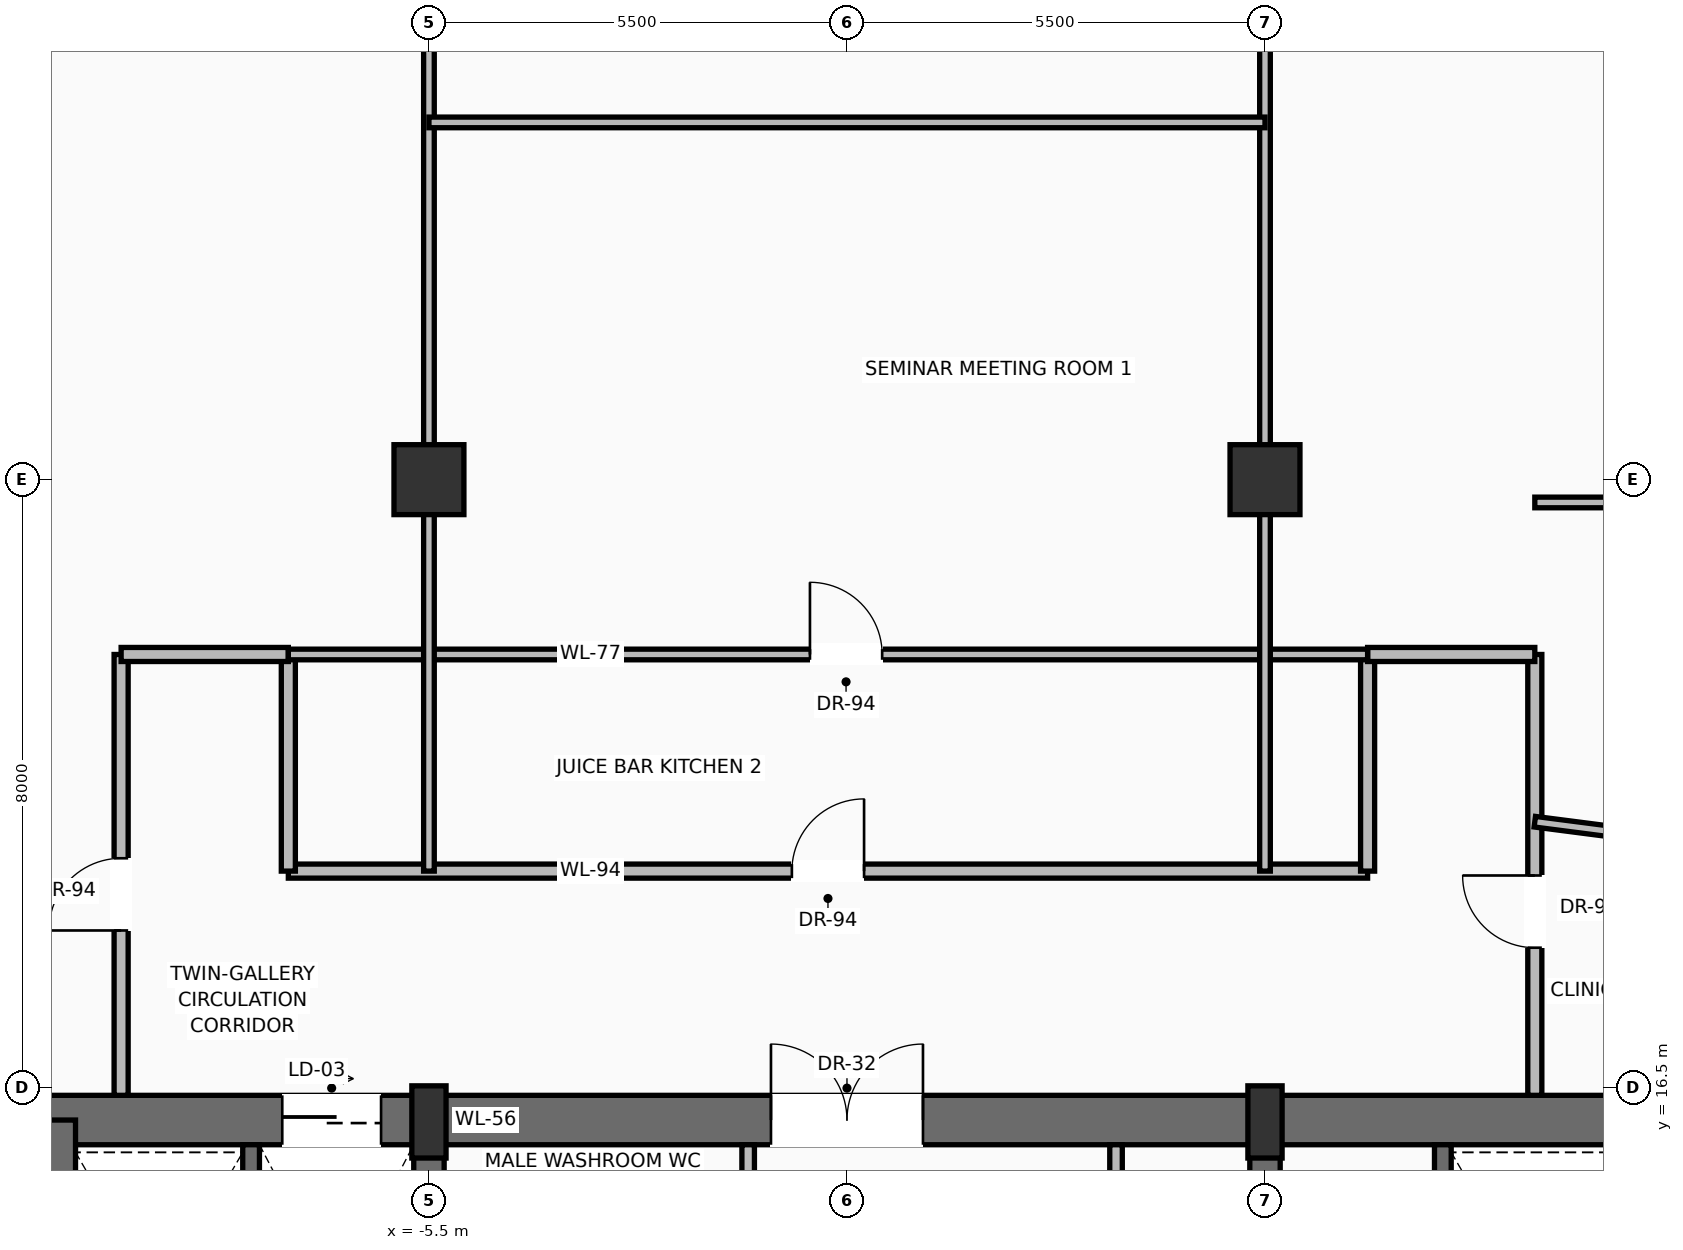
"""IFC4 building model, lengths in metres.
Left out: names, types, materials, properties, quantities, classifications, styles, units other than length and angle.
Written with IfcOpenShell. Run it as: python <this file> out.ifc"""

import sys

from ifc_helpers import new_model, si_unit, direction, frame, frame_2d, origin, origin_2d, place, context, subcontext, project, spatial, rectangle, extrude, source, transform, mapped, element, fill, save


model = new_model("IFC4")
c1 = context("Model", 3, precision=1e-05, world=origin(), true_north=direction((0.0, 1.0)))
c2 = subcontext(c1, "Body", "Model", "MODEL_VIEW")
j1 = project(units=[si_unit("LENGTHUNIT", "METRE"), si_unit("PLANEANGLEUNIT", "RADIAN")], contexts=[c1])
p1 = place(None, origin())
s1 = spatial("IfcSite", under=j1, at=p1, CompositionType="ELEMENT")
p2 = place(p1, origin())
s2 = spatial("IfcBuilding", under=s1, at=p2, CompositionType="ELEMENT")
p3 = place(p2, frame((0.0, 0.0, 204.3)))
s3 = spatial("IfcBuildingStorey", under=s2, at=p3, CompositionType="ELEMENT", Elevation=204.3)
p4 = place(p3, frame((-10.8, 16.075, 0.0), z_axis=(0.0, 0.0, 1.0), x_axis=(1.0, 0.0, 0.0)))
e1 = element("IfcWall", 1, at=p4, inside=s3, PredefinedType="SHEAR", context=c2, shape_type="SweptSolid", body=[
    extrude(rectangle(XDim=21.6, YDim=0.65, at=frame_2d((10.8, 0.0))), origin(), (0.0, 0.0, 1.0), 3.47),
])
p5 = place(p4, frame((3.37, 0.0, 0.0)))
e2 = element("IfcOpeningElement", 2, at=p5, cuts=e1, PredefinedType="OPENING", context=c2, shape_type="SweptSolid", body=[
    extrude(rectangle(XDim=1.3, YDim=2.3, at=frame_2d((0.65, 1.15))), frame((0.0, 0.335, 0.0), z_axis=(0.0, -1.0, 0.0), x_axis=(1.0, 0.0, 0.0)), (0.0, 0.0, 1.0), 0.67),
])
p6 = place(p4, frame((9.8, 0.0, 0.0)))
e3 = element("IfcOpeningElement", 3, at=p6, cuts=e1, PredefinedType="OPENING", context=c2, shape_type="SweptSolid", body=[
    extrude(rectangle(XDim=2.0, YDim=2.4, at=frame_2d((1.0, 1.2))), frame((0.0, 0.335, 0.0), z_axis=(0.0, -1.0, 0.0), x_axis=(1.0, 0.0, 0.0)), (0.0, 0.0, 1.0), 0.67),
])
p7 = place(p3, frame((-10.475, 0.525, 0.0), z_axis=(0.0, 0.0, 1.0), x_axis=(0.0, 1.0, 0.0)))
e4 = element("IfcWall", 4, at=p7, inside=s3, PredefinedType="SHEAR", context=c2, shape_type="SweptSolid", body=[
    extrude(rectangle(XDim=15.55, YDim=0.65, at=frame_2d((7.775, 0.0))), origin(), (0.0, 0.0, 1.0), 3.47),
])
p8 = place(p3, frame((-5.5, 0.525, 0.0), z_axis=(0.0, 0.0, 1.0), x_axis=(0.0, 1.0, 0.0)))
e5 = element("IfcWall", 5, at=p8, inside=s3, PredefinedType="SHEAR", context=c2, shape_type="SweptSolid", body=[
    extrude(rectangle(XDim=15.55, YDim=0.4, at=frame_2d((7.775, 0.0))), origin(), (0.0, 0.0, 1.0), 3.47),
])
p9 = place(p8, frame((8.975, 0.0, 0.0)))
e6 = element("IfcOpeningElement", 6, at=p9, cuts=e5, PredefinedType="OPENING", context=c2, shape_type="SweptSolid", body=[
    extrude(rectangle(XDim=1.1, YDim=2.2, at=frame_2d((0.55, 1.1))), frame((0.0, 0.21, 0.0), z_axis=(0.0, -1.0, 0.0), x_axis=(1.0, 0.0, 0.0)), (0.0, 0.0, 1.0), 0.42),
])
p10 = place(p3, frame((5.5, 0.525, 0.0), z_axis=(0.0, 0.0, 1.0), x_axis=(0.0, 1.0, 0.0)))
e7 = element("IfcWall", 7, at=p10, inside=s3, PredefinedType="SHEAR", context=c2, shape_type="SweptSolid", body=[
    extrude(rectangle(XDim=15.55, YDim=0.4, at=frame_2d((7.775, 0.0))), origin(), (0.0, 0.0, 1.0), 3.47),
])
p11 = place(p10, frame((8.975, 0.0, 0.0)))
e8 = element("IfcOpeningElement", 8, at=p11, cuts=e7, PredefinedType="OPENING", context=c2, shape_type="SweptSolid", body=[
    extrude(rectangle(XDim=1.1, YDim=2.2, at=frame_2d((0.55, 1.1))), frame((0.0, 0.21, 0.0), z_axis=(0.0, -1.0, 0.0), x_axis=(1.0, 0.0, 0.0)), (0.0, 0.0, 1.0), 0.42),
])
m1 = source(origin(), c2, "Body", "SweptSolid", [
    extrude(rectangle(XDim=0.45, YDim=0.95, at=origin_2d()), origin(), (0.0, 0.0, 1.0), 3.7),
])
for number, where, z_axis, x_axis in (
    (9, (-5.5, 16.05, 0.0), (0.0, 0.0, 1.0), (1.0, 0.0, 0.0)),
    (10, (5.5, 16.05, 0.0), (0.0, 0.0, 1.0), (1.0, 0.0, 0.0)),
):
    element("IfcColumn", number, at=place(p3, frame(where, z_axis=z_axis, x_axis=x_axis)), inside=s3, PredefinedType="PILASTER", context=c2, shape_type="MappedRepresentation", body=[
        mapped(m1, transform((0.0, 0.0, 0.0), scale=1.0)),
    ])
m2 = source(origin(), c2, "Body", "SweptSolid", [
    extrude(rectangle(XDim=0.92, YDim=0.92, at=origin_2d()), origin(), (0.0, 0.0, 1.0), 3.7),
])
for number, where, z_axis, x_axis in (
    (11, (-5.5, 24.5, 0.0), (0.0, 0.0, 1.0), (1.0, 0.0, 0.0)),
    (12, (5.5, 24.5, 0.0), (0.0, 0.0, 1.0), (1.0, 0.0, 0.0)),
):
    element("IfcColumn", number, at=place(p3, frame(where, z_axis=z_axis, x_axis=x_axis)), inside=s3, PredefinedType="COLUMN", context=c2, shape_type="MappedRepresentation", body=[
        mapped(m2, transform((0.0, 0.0, 0.0), scale=1.0)),
    ])
p12 = place(p3, frame((-20.107, 15.909, 0.0), z_axis=(0.0, 0.0, 1.0), x_axis=(0.520259714572, 0.854008096796, 0.0)))
e13 = element("IfcWall", 13, at=p12, inside=s3, PredefinedType="SOLIDWALL", context=c2, shape_type="SweptSolid", body=[
    extrude(rectangle(XDim=19.115, YDim=0.28, at=frame_2d((9.558, 0.0))), origin(), (0.0, 0.0, 1.0), 3.05),
])
p13 = place(p12, frame((4.588, 0.0, 0.0)))
e14 = element("IfcOpeningElement", 14, at=p13, cuts=e13, PredefinedType="OPENING", context=c2, shape_type="SweptSolid", body=[
    extrude(rectangle(XDim=1.6, YDim=2.35, at=frame_2d((0.8, 1.175))), frame((0.0, 0.15, 0.0), z_axis=(0.0, -1.0, 0.0), x_axis=(1.0, 0.0, 0.0)), (0.0, 0.0, 1.0), 0.3),
])
p14 = place(p12, frame((12.998, 0.0, 0.9)))
e15 = element("IfcOpeningElement", 15, at=p14, cuts=e13, PredefinedType="OPENING", context=c2, shape_type="SweptSolid", body=[
    extrude(rectangle(XDim=2.0, YDim=1.85, at=frame_2d((1.0, 0.925))), frame((0.0, 0.15, 0.0), z_axis=(0.0, -1.0, 0.0), x_axis=(1.0, 0.0, 0.0)), (0.0, 0.0, 1.0), 0.3),
])
p15 = place(p3, frame((9.417, 32.314, 0.0), z_axis=(0.0, 0.0, 1.0), x_axis=(0.533466142651, -0.845821420067, 0.0)))
e16 = element("IfcWall", 16, at=p15, inside=s3, PredefinedType="SOLIDWALL", context=c2, shape_type="SweptSolid", body=[
    extrude(rectangle(XDim=19.147, YDim=0.28, at=frame_2d((9.574, 0.0))), origin(), (0.0, 0.0, 1.0), 3.05),
])
p16 = place(p15, frame((4.595, 0.0, 0.0)))
e17 = element("IfcOpeningElement", 17, at=p16, cuts=e16, PredefinedType="OPENING", context=c2, shape_type="SweptSolid", body=[
    extrude(rectangle(XDim=1.6, YDim=2.35, at=frame_2d((0.8, 1.175))), frame((0.0, 0.15, 0.0), z_axis=(0.0, -1.0, 0.0), x_axis=(1.0, 0.0, 0.0)), (0.0, 0.0, 1.0), 0.3),
])
p17 = place(p15, frame((13.02, 0.0, 0.9)))
e18 = element("IfcOpeningElement", 18, at=p17, cuts=e16, PredefinedType="OPENING", context=c2, shape_type="SweptSolid", body=[
    extrude(rectangle(XDim=2.0, YDim=1.85, at=frame_2d((1.0, 0.925))), frame((0.0, 0.15, 0.0), z_axis=(0.0, -1.0, 0.0), x_axis=(1.0, 0.0, 0.0)), (0.0, 0.0, 1.0), 0.3),
])
for number, where, z_axis, x_axis in (
    (19, (-7.84, 11.87, 0.0), (0.0, 0.0, 1.0), (0.0, 1.0, 0.0)),
    (20, (7.84, 11.87, 0.0), (0.0, 0.0, 1.0), (0.0, 1.0, 0.0)),
):
    element("IfcWall", number, at=place(p3, frame(where, z_axis=z_axis, x_axis=x_axis)), inside=s3, PredefinedType="SOLIDWALL", context=c2, shape_type="SweptSolid", body=[
        extrude(rectangle(XDim=3.88, YDim=0.22, at=frame_2d((1.94, 0.0))), origin(), (0.0, 0.0, 1.0), 3.47),
    ])
p18 = place(p3, frame((-1.3, 13.6, 0.0), z_axis=(0.0, 0.0, 1.0), x_axis=(0.0, 1.0, 0.0)))
e21 = element("IfcWall", 21, at=p18, inside=s3, PredefinedType="PARTITIONING", context=c2, shape_type="SweptSolid", body=[
    extrude(rectangle(XDim=2.15, YDim=0.165, at=frame_2d((1.075, 0.0))), origin(), (0.0, 0.0, 1.0), 3.462),
])
p19 = place(p18, frame((0.55, 0.0, 0.0)))
e22 = element("IfcOpeningElement", 22, at=p19, cuts=e21, PredefinedType="OPENING", context=c2, shape_type="SweptSolid", body=[
    extrude(rectangle(XDim=0.9, YDim=2.1, at=frame_2d((0.45, 1.05))), frame((0.0, 0.093, 0.0), z_axis=(0.0, -1.0, 0.0), x_axis=(1.0, 0.0, 0.0)), (0.0, 0.0, 1.0), 0.185),
])
p20 = place(p3, frame((3.54, 11.22, 0.0), z_axis=(0.0, 0.0, 1.0), x_axis=(0.0, 1.0, 0.0)))
e23 = element("IfcWall", 23, at=p20, inside=s3, PredefinedType="PARTITIONING", context=c2, shape_type="SweptSolid", body=[
    extrude(rectangle(XDim=4.53, YDim=0.165, at=frame_2d((2.265, 0.0))), origin(), (0.0, 0.0, 1.0), 3.462),
])
p21 = place(p20, frame((1.25, 0.0, 0.0)))
e24 = element("IfcOpeningElement", 24, at=p21, cuts=e23, PredefinedType="OPENING", context=c2, shape_type="SweptSolid", body=[
    extrude(rectangle(XDim=0.9, YDim=2.1, at=frame_2d((0.45, 1.05))), frame((0.0, 0.093, 0.0), z_axis=(0.0, -1.0, 0.0), x_axis=(1.0, 0.0, 0.0)), (0.0, 0.0, 1.0), 0.185),
])
p22 = place(p3, frame((-7.35, 19.35, 0.0), z_axis=(0.0, 0.0, 1.0), x_axis=(1.0, 0.0, 0.0)))
e25 = element("IfcWall", 25, at=p22, inside=s3, PredefinedType="PARTITIONING", context=c2, shape_type="SweptSolid", body=[
    extrude(rectangle(XDim=14.2, YDim=0.185, at=frame_2d((7.1, 0.0))), origin(), (0.0, 0.0, 1.0), 2.846),
])
p23 = place(p22, frame((6.625, 0.0, 0.0)))
e26 = element("IfcOpeningElement", 26, at=p23, cuts=e25, PredefinedType="OPENING", context=c2, shape_type="SweptSolid", body=[
    extrude(rectangle(XDim=0.95, YDim=2.2, at=frame_2d((0.475, 1.1))), frame((0.0, 0.103, 0.0), z_axis=(0.0, -1.0, 0.0), x_axis=(1.0, 0.0, 0.0)), (0.0, 0.0, 1.0), 0.205),
])
for number, where, z_axis, x_axis in (
    (27, (-7.35, 19.35, 0.0), (0.0, 0.0, 1.0), (0.0, 1.0, 0.0)),
    (28, (6.85, 19.35, 0.0), (0.0, 0.0, 1.0), (0.0, 1.0, 0.0)),
):
    element("IfcWall", number, at=place(p3, frame(where, z_axis=z_axis, x_axis=x_axis)), inside=s3, PredefinedType="PARTITIONING", context=c2, shape_type="SweptSolid", body=[
        extrude(rectangle(XDim=2.85, YDim=0.185, at=frame_2d((1.425, 0.0))), origin(), (0.0, 0.0, 1.0), 3.462),
    ])
p24 = place(p3, frame((-9.55, 16.4, 0.0), z_axis=(0.0, 0.0, 1.0), x_axis=(0.0, 1.0, 0.0)))
e29 = element("IfcWall", 29, at=p24, inside=s3, PredefinedType="PARTITIONING", context=c2, shape_type="SweptSolid", body=[
    extrude(rectangle(XDim=5.8, YDim=0.185, at=frame_2d((2.9, 0.0))), origin(), (0.0, 0.0, 1.0), 3.462),
])
p25 = place(p24, frame((2.169, 0.0, 0.0)))
e30 = element("IfcOpeningElement", 30, at=p25, cuts=e29, PredefinedType="OPENING", context=c2, shape_type="SweptSolid", body=[
    extrude(rectangle(XDim=0.95, YDim=2.2, at=frame_2d((0.475, 1.1))), frame((0.0, 0.103, 0.0), z_axis=(0.0, -1.0, 0.0), x_axis=(1.0, 0.0, 0.0)), (0.0, 0.0, 1.0), 0.205),
])
p26 = place(p3, frame((9.05, 16.4, 0.0), z_axis=(0.0, 0.0, 1.0), x_axis=(0.0, 1.0, 0.0)))
e31 = element("IfcWall", 31, at=p26, inside=s3, PredefinedType="PARTITIONING", context=c2, shape_type="SweptSolid", body=[
    extrude(rectangle(XDim=5.8, YDim=0.185, at=frame_2d((2.9, 0.0))), origin(), (0.0, 0.0, 1.0), 3.462),
])
p27 = place(p26, frame((1.942, 0.0, 0.0)))
e32 = element("IfcOpeningElement", 32, at=p27, cuts=e31, PredefinedType="OPENING", context=c2, shape_type="SweptSolid", body=[
    extrude(rectangle(XDim=0.95, YDim=2.2, at=frame_2d((0.475, 1.1))), frame((0.0, 0.103, 0.0), z_axis=(0.0, -1.0, 0.0), x_axis=(1.0, 0.0, 0.0)), (0.0, 0.0, 1.0), 0.205),
])
for number, where, z_axis, x_axis in (
    (33, (-9.55, 22.2, 0.0), (0.0, 0.0, 1.0), (1.0, 0.0, 0.0)),
    (34, (6.85, 22.2, 0.0), (0.0, 0.0, 1.0), (1.0, 0.0, 0.0)),
):
    element("IfcWall", number, at=place(p3, frame(where, z_axis=z_axis, x_axis=x_axis)), inside=s3, PredefinedType="PARTITIONING", context=c2, shape_type="SweptSolid", body=[
        extrude(rectangle(XDim=2.2, YDim=0.185, at=frame_2d((1.1, 0.0))), origin(), (0.0, 0.0, 1.0), 3.049),
    ])
p28 = place(p3, frame((-7.35, 22.2, 0.0), z_axis=(0.0, 0.0, 1.0), x_axis=(1.0, 0.0, 0.0)))
e35 = element("IfcWall", 35, at=p28, inside=s3, PredefinedType="PARTITIONING", context=c2, shape_type="SweptSolid", body=[
    extrude(rectangle(XDim=14.2, YDim=0.14, at=frame_2d((7.1, 0.0))), origin(), (0.0, 0.0, 1.0), 3.049),
])
p29 = place(p28, frame((6.863, 0.0, 0.0)))
e36 = element("IfcOpeningElement", 36, at=p29, cuts=e35, PredefinedType="OPENING", context=c2, shape_type="SweptSolid", body=[
    extrude(rectangle(XDim=0.95, YDim=2.2, at=frame_2d((0.475, 1.1))), frame((0.0, 0.08, 0.0), z_axis=(0.0, -1.0, 0.0), x_axis=(1.0, 0.0, 0.0)), (0.0, 0.0, 1.0), 0.16),
])
for number, where, z_axis, x_axis in (
    (37, (-5.5, 19.35, 0.0), (0.0, 0.0, 1.0), (0.0, 1.0, 0.0)),
    (38, (5.5, 19.35, 0.0), (0.0, 0.0, 1.0), (0.0, 1.0, 0.0)),
):
    element("IfcWall", number, at=place(p3, frame(where, z_axis=z_axis, x_axis=x_axis)), inside=s3, PredefinedType="PARTITIONING", context=c2, shape_type="SweptSolid", body=[
        extrude(rectangle(XDim=13.15, YDim=0.14, at=frame_2d((6.575, 0.0))), origin(), (0.0, 0.0, 1.0), 2.846),
    ])
p30 = place(p3, frame((-5.5, 29.2, 0.0), z_axis=(0.0, 0.0, 1.0), x_axis=(1.0, 0.0, 0.0)))
e39 = element("IfcWall", 39, at=p30, inside=s3, PredefinedType="PARTITIONING", context=c2, shape_type="SweptSolid", body=[
    extrude(rectangle(XDim=11.0, YDim=0.14, at=frame_2d((5.5, 0.0))), origin(), (0.0, 0.0, 1.0), 3.462),
])
p31 = place(p3, frame((9.05, 20.0, 0.0), z_axis=(0.0, 0.0, 1.0), x_axis=(0.991742120267, -0.128248067777, 0.0)))
e40 = element("IfcWall", 40, at=p31, inside=s3, PredefinedType="PARTITIONING", context=c2, shape_type="SweptSolid", body=[
    extrude(rectangle(XDim=9.098, YDim=0.14, at=frame_2d((4.549, 0.0))), origin(), (0.0, 0.0, 1.0), 3.049),
])
p32 = place(p3, frame((9.05, 24.2, 0.0), z_axis=(0.0, 0.0, 1.0), x_axis=(1.0, 0.0, 0.0)))
e41 = element("IfcWall", 41, at=p32, inside=s3, PredefinedType="PARTITIONING", context=c2, shape_type="SweptSolid", body=[
    extrude(rectangle(XDim=5.638, YDim=0.14, at=frame_2d((2.819, 0.0))), origin(), (0.0, 0.0, 1.0), 3.462),
])
m3 = source(origin(), c2, "Body", "SweptSolid", [
    extrude(rectangle(XDim=1.3, YDim=2.3, at=frame_2d((0.65, 1.15))), frame((0.0, 0.025, 0.0), z_axis=(0.0, -1.0, 0.0), x_axis=(1.0, 0.0, 0.0)), (0.0, 0.0, 1.0), 0.05),
])
p33 = place(p5, origin())
e42 = element("IfcDoor", 42, at=p33, inside=s3, OperationType="SLIDING_TO_RIGHT", PredefinedType="DOOR", context=c2, shape_type="MappedRepresentation", body=[
    mapped(m3, transform((0.0, 0.0, 0.0), scale=1.0)),
])
fill(e2, e42)
m4 = source(origin(), c2, "Body", "SweptSolid", [
    extrude(rectangle(XDim=2.0, YDim=2.4, at=frame_2d((1.0, 1.2))), frame((0.0, 0.025, 0.0), z_axis=(0.0, -1.0, 0.0), x_axis=(1.0, 0.0, 0.0)), (0.0, 0.0, 1.0), 0.05),
])
p34 = place(p6, origin())
e43 = element("IfcDoor", 43, at=p34, inside=s3, OperationType="DOUBLE_DOOR_SINGLE_SWING", PredefinedType="DOOR", context=c2, shape_type="MappedRepresentation", body=[
    mapped(m4, transform((0.0, 0.0, 0.0), scale=1.0)),
])
fill(e3, e43)
m5 = source(origin(), c2, "Body", "SweptSolid", [
    extrude(rectangle(XDim=0.95, YDim=2.2, at=frame_2d((0.475, 1.1))), frame((0.0, 0.025, 0.0), z_axis=(0.0, -1.0, 0.0), x_axis=(1.0, 0.0, 0.0)), (0.0, 0.0, 1.0), 0.05),
])
p35 = place(p23, origin())
e44 = element("IfcDoor", 44, at=p35, inside=s3, OperationType="SINGLE_SWING_RIGHT", PredefinedType="DOOR", context=c2, shape_type="MappedRepresentation", body=[
    mapped(m5, transform((0.0, 0.0, 0.0), scale=1.0)),
])
fill(e26, e44)
p36 = place(p25, origin())
e45 = element("IfcDoor", 45, at=p36, inside=s3, OperationType="SINGLE_SWING_LEFT", PredefinedType="DOOR", context=c2, shape_type="MappedRepresentation", body=[
    mapped(m5, transform((0.0, 0.0, 0.0), scale=1.0)),
])
fill(e30, e45)
p37 = place(p27, origin())
e46 = element("IfcDoor", 46, at=p37, inside=s3, OperationType="SINGLE_SWING_RIGHT", PredefinedType="DOOR", context=c2, shape_type="MappedRepresentation", body=[
    mapped(m5, transform((0.0, 0.0, 0.0), scale=1.0)),
])
fill(e32, e46)
p38 = place(p29, origin())
e47 = element("IfcDoor", 47, at=p38, inside=s3, OperationType="SINGLE_SWING_LEFT", PredefinedType="DOOR", context=c2, shape_type="MappedRepresentation", body=[
    mapped(m5, transform((0.0, 0.0, 0.0), scale=1.0)),
])
fill(e36, e47)
save(model, sys.argv[1])
